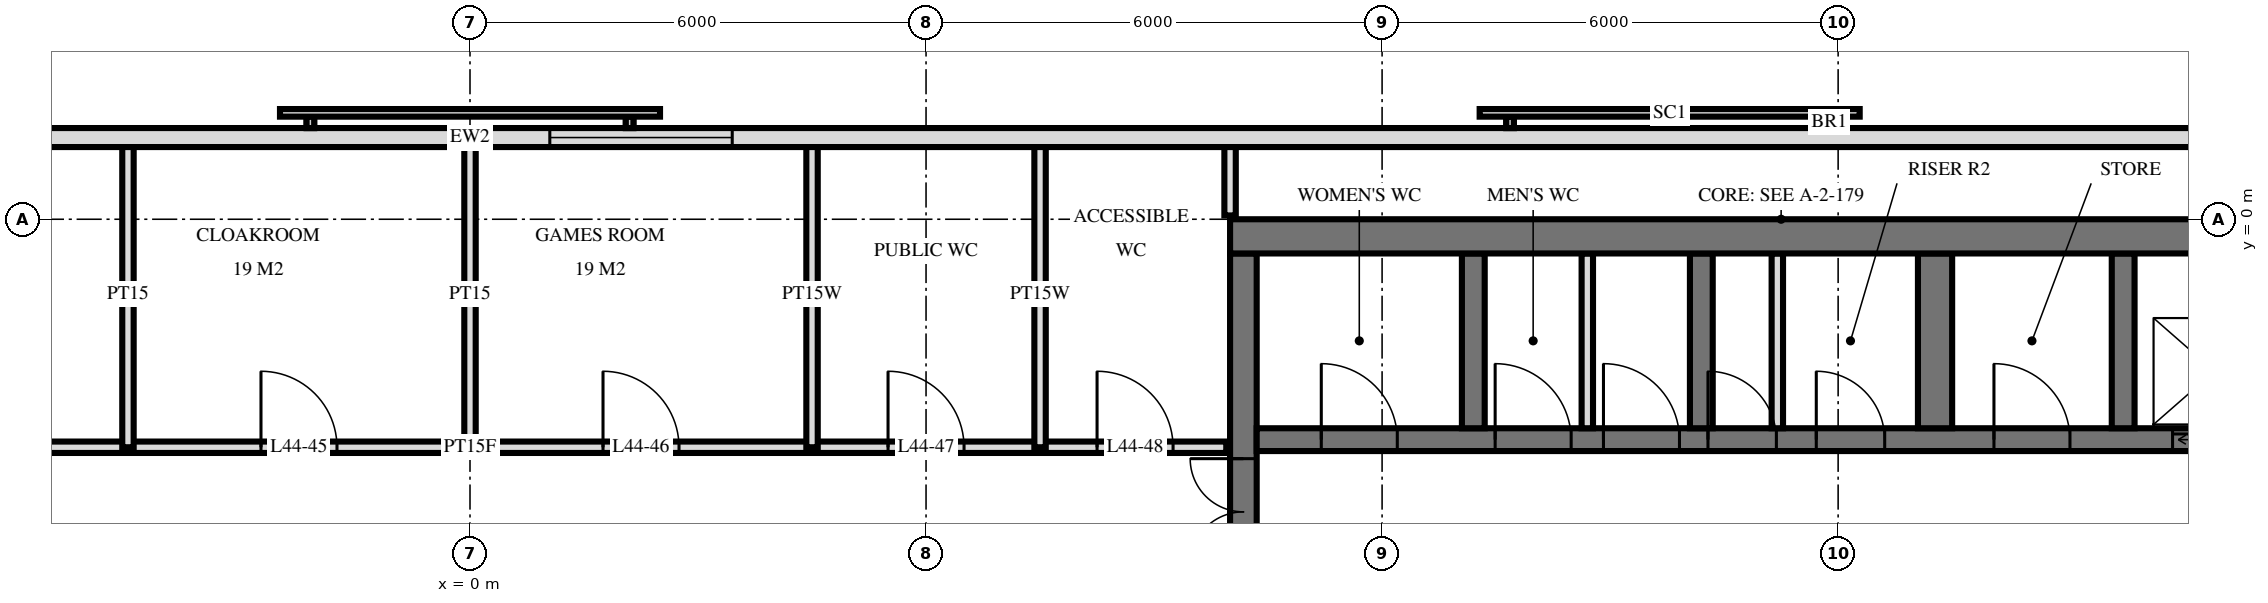
"""IFC4 building model, lengths in metres.
Left out: names, types, materials, properties, quantities, classifications, styles, units other than length and angle.
Written with IfcOpenShell. Run it as: python <this file> out.ifc"""

import sys

from ifc_helpers import new_model, si_unit, direction, frame, frame_2d, origin, place, context, subcontext, project, spatial, rectangle, extrude, element, fill, save


model = new_model("IFC4")
c1 = context("Model", 3, precision=1e-05, world=origin(), true_north=direction((0.0, 1.0)))
c2 = subcontext(c1, "Body", "Model", "MODEL_VIEW")
j1 = project(units=[si_unit("LENGTHUNIT", "METRE"), si_unit("PLANEANGLEUNIT", "RADIAN")], contexts=[c1])
p1 = place(None, origin())
s1 = spatial("IfcSite", under=j1, at=p1, CompositionType="ELEMENT")
p2 = place(p1, origin())
s2 = spatial("IfcBuilding", under=s1, at=p2, CompositionType="ELEMENT")
p3 = place(p2, frame((0.0, 0.0, 170.4)))
s3 = spatial("IfcBuildingStorey", under=s2, at=p3, CompositionType="ELEMENT", Elevation=170.4)
p4 = place(p3, frame((10.0, -0.225, 0.0), z_axis=(0.0, 0.0, 1.0), x_axis=(1.0, 0.0, 0.0)))
e1 = element("IfcWall", 1, at=p4, inside=s3, PredefinedType="SHEAR", context=c2, shape_type="SweptSolid", body=[
    extrude(rectangle(XDim=14.5, YDim=0.45, at=frame_2d((7.25, 0.0))), origin(), (0.0, 0.0, 1.0), 3.6),
])
p5 = place(p3, frame((10.175, -14.55, 0.0), z_axis=(0.0, 0.0, 1.0), x_axis=(0.0, 1.0, 0.0)))
e2 = element("IfcWall", 2, at=p5, inside=s3, PredefinedType="SHEAR", context=c2, shape_type="SweptSolid", body=[
    extrude(rectangle(XDim=14.1, YDim=0.35, at=frame_2d((7.05, 0.0))), origin(), (0.0, 0.0, 1.0), 3.6),
])
p6 = place(p5, frame((8.4, 0.0, 0.0)))
e3 = element("IfcOpeningElement", 3, at=p6, cuts=e2, PredefinedType="OPENING", context=c2, shape_type="SweptSolid", body=[
    extrude(rectangle(XDim=1.4, YDim=2.4, at=frame_2d((0.7, 1.2))), frame((0.0, 0.185, 0.0), z_axis=(0.0, -1.0, 0.0), x_axis=(1.0, 0.0, 0.0)), (0.0, 0.0, 1.0), 0.37),
])
p7 = place(p5, frame((10.0, 0.0, 0.0)))
e4 = element("IfcOpeningElement", 4, at=p7, cuts=e2, PredefinedType="OPENING", context=c2, shape_type="SweptSolid", body=[
    extrude(rectangle(XDim=1.4, YDim=2.4, at=frame_2d((0.7, 1.2))), frame((0.0, 0.185, 0.0), z_axis=(0.0, -1.0, 0.0), x_axis=(1.0, 0.0, 0.0)), (0.0, 0.0, 1.0), 0.37),
])
p8 = place(p5, frame((4.0, 0.0, 0.0)))
e5 = element("IfcOpeningElement", 5, at=p8, cuts=e2, PredefinedType="OPENING", context=c2, shape_type="SweptSolid", body=[
    extrude(rectangle(XDim=1.2, YDim=2.1, at=frame_2d((0.6, 1.05))), frame((0.0, 0.185, 0.0), z_axis=(0.0, -1.0, 0.0), x_axis=(1.0, 0.0, 0.0)), (0.0, 0.0, 1.0), 0.37),
])
p9 = place(p3, frame((10.35, -2.9, 0.0), z_axis=(0.0, 0.0, 1.0), x_axis=(1.0, 0.0, 0.0)))
e6 = element("IfcWall", 6, at=p9, inside=s3, PredefinedType="SHEAR", context=c2, shape_type="SweptSolid", body=[
    extrude(rectangle(XDim=13.7, YDim=0.3, at=frame_2d((6.85, 0.0))), origin(), (0.0, 0.0, 1.0), 3.6),
])
p10 = place(p9, frame((12.05, 0.0, 0.0)))
e7 = element("IfcOpeningElement", 7, at=p10, cuts=e6, PredefinedType="OPENING", context=c2, shape_type="SweptSolid", body=[
    extrude(rectangle(XDim=1.1, YDim=2.1, at=frame_2d((0.55, 1.05))), frame((0.0, 0.16, 0.0), z_axis=(0.0, -1.0, 0.0), x_axis=(1.0, 0.0, 0.0)), (0.0, 0.0, 1.0), 0.32),
])
p11 = place(p9, frame((5.938, 0.0, 0.0)))
e8 = element("IfcOpeningElement", 8, at=p11, cuts=e6, PredefinedType="OPENING", context=c2, shape_type="SweptSolid", body=[
    extrude(rectangle(XDim=0.9, YDim=2.1, at=frame_2d((0.45, 1.05))), frame((0.0, 0.16, 0.0), z_axis=(0.0, -1.0, 0.0), x_axis=(1.0, 0.0, 0.0)), (0.0, 0.0, 1.0), 0.32),
])
p12 = place(p9, frame((7.363, 0.0, 0.0)))
e9 = element("IfcOpeningElement", 9, at=p12, cuts=e6, PredefinedType="OPENING", context=c2, shape_type="SweptSolid", body=[
    extrude(rectangle(XDim=0.9, YDim=2.1, at=frame_2d((0.45, 1.05))), frame((0.0, 0.16, 0.0), z_axis=(0.0, -1.0, 0.0), x_axis=(1.0, 0.0, 0.0)), (0.0, 0.0, 1.0), 0.32),
])
p13 = place(p9, frame((0.85, 0.0, 0.0)))
e10 = element("IfcOpeningElement", 10, at=p13, cuts=e6, PredefinedType="OPENING", context=c2, shape_type="SweptSolid", body=[
    extrude(rectangle(XDim=1.0, YDim=2.1, at=frame_2d((0.5, 1.05))), frame((0.0, 0.16, 0.0), z_axis=(0.0, -1.0, 0.0), x_axis=(1.0, 0.0, 0.0)), (0.0, 0.0, 1.0), 0.32),
])
p14 = place(p9, frame((3.137, 0.0, 0.0)))
e11 = element("IfcOpeningElement", 11, at=p14, cuts=e6, PredefinedType="OPENING", context=c2, shape_type="SweptSolid", body=[
    extrude(rectangle(XDim=1.0, YDim=2.1, at=frame_2d((0.5, 1.05))), frame((0.0, 0.16, 0.0), z_axis=(0.0, -1.0, 0.0), x_axis=(1.0, 0.0, 0.0)), (0.0, 0.0, 1.0), 0.32),
])
p15 = place(p9, frame((4.562, 0.0, 0.0)))
e12 = element("IfcOpeningElement", 12, at=p15, cuts=e6, PredefinedType="OPENING", context=c2, shape_type="SweptSolid", body=[
    extrude(rectangle(XDim=1.0, YDim=2.1, at=frame_2d((0.5, 1.05))), frame((0.0, 0.16, 0.0), z_axis=(0.0, -1.0, 0.0), x_axis=(1.0, 0.0, 0.0)), (0.0, 0.0, 1.0), 0.32),
])
p16 = place(p9, frame((9.7, 0.0, 0.0)))
e13 = element("IfcOpeningElement", 13, at=p16, cuts=e6, PredefinedType="OPENING", context=c2, shape_type="SweptSolid", body=[
    extrude(rectangle(XDim=1.0, YDim=2.1, at=frame_2d((0.5, 1.05))), frame((0.0, 0.16, 0.0), z_axis=(0.0, -1.0, 0.0), x_axis=(1.0, 0.0, 0.0)), (0.0, 0.0, 1.0), 0.32),
])
for number, where, z_axis, x_axis in (
    (14, (13.2, -2.75, 0.0), (0.0, 0.0, 1.0), (0.0, 1.0, 0.0)),
    (15, (16.2, -2.75, 0.0), (0.0, 0.0, 1.0), (0.0, 1.0, 0.0)),
):
    element("IfcWall", number, at=place(p3, frame(where, z_axis=z_axis, x_axis=x_axis)), inside=s3, PredefinedType="SHEAR", context=c2, shape_type="SweptSolid", body=[
        extrude(rectangle(XDim=2.3, YDim=0.3, at=frame_2d((1.15, 0.0))), origin(), (0.0, 0.0, 1.0), 3.6),
    ])
p17 = place(p3, frame((19.275, -2.75, 0.0), z_axis=(0.0, 0.0, 1.0), x_axis=(0.0, 1.0, 0.0)))
e16 = element("IfcWall", 16, at=p17, inside=s3, PredefinedType="SHEAR", context=c2, shape_type="SweptSolid", body=[
    extrude(rectangle(XDim=2.3, YDim=0.45, at=frame_2d((1.15, 0.0))), origin(), (0.0, 0.0, 1.0), 3.6),
])
p18 = place(p3, frame((21.75, -2.75, 0.0), z_axis=(0.0, 0.0, 1.0), x_axis=(0.0, 1.0, 0.0)))
e17 = element("IfcWall", 17, at=p18, inside=s3, PredefinedType="SHEAR", context=c2, shape_type="SweptSolid", body=[
    extrude(rectangle(XDim=2.3, YDim=0.3, at=frame_2d((1.15, 0.0))), origin(), (0.0, 0.0, 1.0), 3.6),
])
p19 = place(p3, frame((23.675, 1.075, 0.0), z_axis=(0.0, 0.0, 1.0), x_axis=(-1.0, 0.0, 0.0)))
e18 = element("IfcWall", 18, at=p19, inside=s3, PredefinedType="SOLIDWALL", context=c2, shape_type="SweptSolid", body=[
    extrude(rectangle(XDim=47.351, YDim=0.25, at=frame_2d((23.675, 0.0))), origin(), (0.0, 0.0, 1.0), 3.32),
])
p20 = place(p19, frame((20.225, 0.0, 0.3)))
e19 = element("IfcOpeningElement", 19, at=p20, cuts=e18, PredefinedType="OPENING", context=c2, shape_type="SweptSolid", body=[
    extrude(rectangle(XDim=2.4, YDim=2.1, at=frame_2d((1.2, 1.05))), frame((0.0, 0.135, 0.0), z_axis=(0.0, -1.0, 0.0), x_axis=(1.0, 0.0, 0.0)), (0.0, 0.0, 1.0), 0.27),
])
p21 = place(p19, frame((30.275, 0.0, 0.3)))
e20 = element("IfcOpeningElement", 20, at=p21, cuts=e18, PredefinedType="OPENING", context=c2, shape_type="SweptSolid", body=[
    extrude(rectangle(XDim=2.4, YDim=2.1, at=frame_2d((1.2, 1.05))), frame((0.0, 0.135, 0.0), z_axis=(0.0, -1.0, 0.0), x_axis=(1.0, 0.0, 0.0)), (0.0, 0.0, 1.0), 0.27),
])
for number, where, z_axis, x_axis in (
    (21, (17.2, -2.75, 0.0), (0.0, 0.0, 1.0), (0.0, 1.0, 0.0)),
    (22, (14.7, -2.75, 0.0), (0.0, 0.0, 1.0), (0.0, 1.0, 0.0)),
):
    element("IfcWall", number, at=place(p3, frame(where, z_axis=z_axis, x_axis=x_axis)), inside=s3, PredefinedType="PARTITIONING", context=c2, shape_type="SweptSolid", body=[
        extrude(rectangle(XDim=2.3, YDim=0.15, at=frame_2d((1.15, 0.0))), origin(), (0.0, 0.0, 1.0), 3.3),
    ])
p22 = place(p3, frame((10.0, 0.05, 0.0), z_axis=(0.0, 0.0, 1.0), x_axis=(0.0, 1.0, 0.0)))
e23 = element("IfcWall", 23, at=p22, inside=s3, PredefinedType="PLUMBINGWALL", context=c2, shape_type="SweptSolid", body=[
    extrude(rectangle(XDim=0.97, YDim=0.15, at=frame_2d((0.485, 0.0))), origin(), (0.0, 0.0, 1.0), 3.32),
])
for number, where, z_axis, x_axis in (
    (24, (7.5, -3.0, 0.0), (0.0, 0.0, 1.0), (0.0, 1.0, 0.0)),
    (25, (4.5, -3.0, 0.0), (0.0, 0.0, 1.0), (0.0, 1.0, 0.0)),
):
    element("IfcWall", number, at=place(p3, frame(where, z_axis=z_axis, x_axis=x_axis)), inside=s3, PredefinedType="PLUMBINGWALL", context=c2, shape_type="SweptSolid", body=[
        extrude(rectangle(XDim=4.02, YDim=0.15, at=frame_2d((2.01, 0.0))), origin(), (0.0, 0.0, 1.0), 3.32),
    ])
for number, where, z_axis, x_axis in (
    (26, (0.0, -3.0, 0.0), (0.0, 0.0, 1.0), (0.0, 1.0, 0.0)),
    (27, (-4.5, -3.0, 0.0), (0.0, 0.0, 1.0), (0.0, 1.0, 0.0)),
):
    element("IfcWall", number, at=place(p3, frame(where, z_axis=z_axis, x_axis=x_axis)), inside=s3, PredefinedType="PARTITIONING", context=c2, shape_type="SweptSolid", body=[
        extrude(rectangle(XDim=4.02, YDim=0.15, at=frame_2d((2.01, 0.0))), origin(), (0.0, 0.0, 1.0), 3.32),
    ])
p23 = place(p3, frame((-9.95, -3.0, 0.0), z_axis=(0.0, 0.0, 1.0), x_axis=(1.0, 0.0, 0.0)))
e28 = element("IfcWall", 28, at=p23, inside=s3, PredefinedType="PARTITIONING", context=c2, shape_type="SweptSolid", body=[
    extrude(rectangle(XDim=19.9, YDim=0.15, at=frame_2d((9.95, 0.0))), origin(), (0.0, 0.0, 1.0), 3.32),
])
p24 = place(p23, frame((2.2, 0.0, 0.0)))
e29 = element("IfcOpeningElement", 29, at=p24, cuts=e28, PredefinedType="OPENING", context=c2, shape_type="SweptSolid", body=[
    extrude(rectangle(XDim=1.0, YDim=2.1, at=frame_2d((0.5, 1.05))), frame((0.0, 0.085, 0.0), z_axis=(0.0, -1.0, 0.0), x_axis=(1.0, 0.0, 0.0)), (0.0, 0.0, 1.0), 0.17),
])
p25 = place(p23, frame((7.2, 0.0, 0.0)))
e30 = element("IfcOpeningElement", 30, at=p25, cuts=e28, PredefinedType="OPENING", context=c2, shape_type="SweptSolid", body=[
    extrude(rectangle(XDim=1.0, YDim=2.1, at=frame_2d((0.5, 1.05))), frame((0.0, 0.085, 0.0), z_axis=(0.0, -1.0, 0.0), x_axis=(1.0, 0.0, 0.0)), (0.0, 0.0, 1.0), 0.17),
])
p26 = place(p23, frame((11.7, 0.0, 0.0)))
e31 = element("IfcOpeningElement", 31, at=p26, cuts=e28, PredefinedType="OPENING", context=c2, shape_type="SweptSolid", body=[
    extrude(rectangle(XDim=1.0, YDim=2.1, at=frame_2d((0.5, 1.05))), frame((0.0, 0.085, 0.0), z_axis=(0.0, -1.0, 0.0), x_axis=(1.0, 0.0, 0.0)), (0.0, 0.0, 1.0), 0.17),
])
p27 = place(p23, frame((15.45, 0.0, 0.0)))
e32 = element("IfcOpeningElement", 32, at=p27, cuts=e28, PredefinedType="OPENING", context=c2, shape_type="SweptSolid", body=[
    extrude(rectangle(XDim=1.0, YDim=2.1, at=frame_2d((0.5, 1.05))), frame((0.0, 0.085, 0.0), z_axis=(0.0, -1.0, 0.0), x_axis=(1.0, 0.0, 0.0)), (0.0, 0.0, 1.0), 0.17),
])
p28 = place(p23, frame((18.2, 0.0, 0.0)))
e33 = element("IfcOpeningElement", 33, at=p28, cuts=e28, PredefinedType="OPENING", context=c2, shape_type="SweptSolid", body=[
    extrude(rectangle(XDim=1.0, YDim=2.1, at=frame_2d((0.5, 1.05))), frame((0.0, 0.085, 0.0), z_axis=(0.0, -1.0, 0.0), x_axis=(1.0, 0.0, 0.0)), (0.0, 0.0, 1.0), 0.17),
])
p29 = place(p20, origin())
e34 = element("IfcWindow", 34, at=p29, inside=s3, PartitioningType="SINGLE_PANEL", PredefinedType="WINDOW", context=c2, shape_type="SweptSolid", body=[
    extrude(rectangle(XDim=2.4, YDim=2.1, at=frame_2d((1.2, 1.05))), frame((0.0, 0.03, 0.0), z_axis=(0.0, -1.0, 0.0), x_axis=(1.0, 0.0, 0.0)), (0.0, 0.0, 1.0), 0.06),
])
fill(e19, e34)
p30 = place(p10, origin())
e35 = element("IfcDoor", 35, at=p30, inside=s3, OperationType="DOUBLE_DOOR_SLIDING", PredefinedType="USERDEFINED", context=c2, shape_type="SweptSolid", body=[
    extrude(rectangle(XDim=1.1, YDim=2.1, at=frame_2d((0.55, 1.05))), frame((0.0, 0.025, 0.0), z_axis=(0.0, -1.0, 0.0), x_axis=(1.0, 0.0, 0.0)), (0.0, 0.0, 1.0), 0.05),
])
fill(e7, e35)
p31 = place(p7, origin())
e36 = element("IfcDoor", 36, at=p31, inside=s3, OperationType="DOUBLE_DOOR_SINGLE_SWING", PredefinedType="DOOR", context=c2, shape_type="SweptSolid", body=[
    extrude(rectangle(XDim=1.4, YDim=2.4, at=frame_2d((0.7, 1.2))), frame((0.0, 0.025, 0.0), z_axis=(0.0, -1.0, 0.0), x_axis=(1.0, 0.0, 0.0)), (0.0, 0.0, 1.0), 0.05),
])
fill(e4, e36)
p32 = place(p11, origin())
e37 = element("IfcDoor", 37, at=p32, inside=s3, OperationType="SINGLE_SWING_RIGHT", PredefinedType="DOOR", context=c2, shape_type="SweptSolid", body=[
    extrude(rectangle(XDim=0.9, YDim=2.1, at=frame_2d((0.45, 1.05))), frame((0.0, 0.025, 0.0), z_axis=(0.0, -1.0, 0.0), x_axis=(1.0, 0.0, 0.0)), (0.0, 0.0, 1.0), 0.05),
])
fill(e8, e37)
p33 = place(p12, origin())
e38 = element("IfcDoor", 38, at=p33, inside=s3, OperationType="SINGLE_SWING_RIGHT", PredefinedType="DOOR", context=c2, shape_type="SweptSolid", body=[
    extrude(rectangle(XDim=0.9, YDim=2.1, at=frame_2d((0.45, 1.05))), frame((0.0, 0.025, 0.0), z_axis=(0.0, -1.0, 0.0), x_axis=(1.0, 0.0, 0.0)), (0.0, 0.0, 1.0), 0.05),
])
fill(e9, e38)
p34 = place(p13, origin())
e39 = element("IfcDoor", 39, at=p34, inside=s3, OperationType="SINGLE_SWING_RIGHT", PredefinedType="DOOR", context=c2, shape_type="SweptSolid", body=[
    extrude(rectangle(XDim=1.0, YDim=2.1, at=frame_2d((0.5, 1.05))), frame((0.0, 0.025, 0.0), z_axis=(0.0, -1.0, 0.0), x_axis=(1.0, 0.0, 0.0)), (0.0, 0.0, 1.0), 0.05),
])
fill(e10, e39)
p35 = place(p14, origin())
e40 = element("IfcDoor", 40, at=p35, inside=s3, OperationType="SINGLE_SWING_RIGHT", PredefinedType="DOOR", context=c2, shape_type="SweptSolid", body=[
    extrude(rectangle(XDim=1.0, YDim=2.1, at=frame_2d((0.5, 1.05))), frame((0.0, 0.025, 0.0), z_axis=(0.0, -1.0, 0.0), x_axis=(1.0, 0.0, 0.0)), (0.0, 0.0, 1.0), 0.05),
])
fill(e11, e40)
p36 = place(p15, origin())
e41 = element("IfcDoor", 41, at=p36, inside=s3, OperationType="SINGLE_SWING_RIGHT", PredefinedType="DOOR", context=c2, shape_type="SweptSolid", body=[
    extrude(rectangle(XDim=1.0, YDim=2.1, at=frame_2d((0.5, 1.05))), frame((0.0, 0.025, 0.0), z_axis=(0.0, -1.0, 0.0), x_axis=(1.0, 0.0, 0.0)), (0.0, 0.0, 1.0), 0.05),
])
fill(e12, e41)
p37 = place(p16, origin())
e42 = element("IfcDoor", 42, at=p37, inside=s3, OperationType="SINGLE_SWING_RIGHT", PredefinedType="DOOR", context=c2, shape_type="SweptSolid", body=[
    extrude(rectangle(XDim=1.0, YDim=2.1, at=frame_2d((0.5, 1.05))), frame((0.0, 0.025, 0.0), z_axis=(0.0, -1.0, 0.0), x_axis=(1.0, 0.0, 0.0)), (0.0, 0.0, 1.0), 0.05),
])
fill(e13, e42)
p38 = place(p25, origin())
e43 = element("IfcDoor", 43, at=p38, inside=s3, OperationType="SINGLE_SWING_RIGHT", PredefinedType="DOOR", context=c2, shape_type="SweptSolid", body=[
    extrude(rectangle(XDim=1.0, YDim=2.1, at=frame_2d((0.5, 1.05))), frame((0.0, 0.025, 0.0), z_axis=(0.0, -1.0, 0.0), x_axis=(1.0, 0.0, 0.0)), (0.0, 0.0, 1.0), 0.05),
])
fill(e30, e43)
p39 = place(p26, origin())
e44 = element("IfcDoor", 44, at=p39, inside=s3, OperationType="SINGLE_SWING_RIGHT", PredefinedType="DOOR", context=c2, shape_type="SweptSolid", body=[
    extrude(rectangle(XDim=1.0, YDim=2.1, at=frame_2d((0.5, 1.05))), frame((0.0, 0.025, 0.0), z_axis=(0.0, -1.0, 0.0), x_axis=(1.0, 0.0, 0.0)), (0.0, 0.0, 1.0), 0.05),
])
fill(e31, e44)
p40 = place(p27, origin())
e45 = element("IfcDoor", 45, at=p40, inside=s3, OperationType="SINGLE_SWING_RIGHT", PredefinedType="DOOR", context=c2, shape_type="SweptSolid", body=[
    extrude(rectangle(XDim=1.0, YDim=2.1, at=frame_2d((0.5, 1.05))), frame((0.0, 0.025, 0.0), z_axis=(0.0, -1.0, 0.0), x_axis=(1.0, 0.0, 0.0)), (0.0, 0.0, 1.0), 0.05),
])
fill(e32, e45)
p41 = place(p28, origin())
e46 = element("IfcDoor", 46, at=p41, inside=s3, OperationType="SINGLE_SWING_RIGHT", PredefinedType="DOOR", context=c2, shape_type="SweptSolid", body=[
    extrude(rectangle(XDim=1.0, YDim=2.1, at=frame_2d((0.5, 1.05))), frame((0.0, 0.025, 0.0), z_axis=(0.0, -1.0, 0.0), x_axis=(1.0, 0.0, 0.0)), (0.0, 0.0, 1.0), 0.05),
])
fill(e33, e46)
save(model, sys.argv[1])
